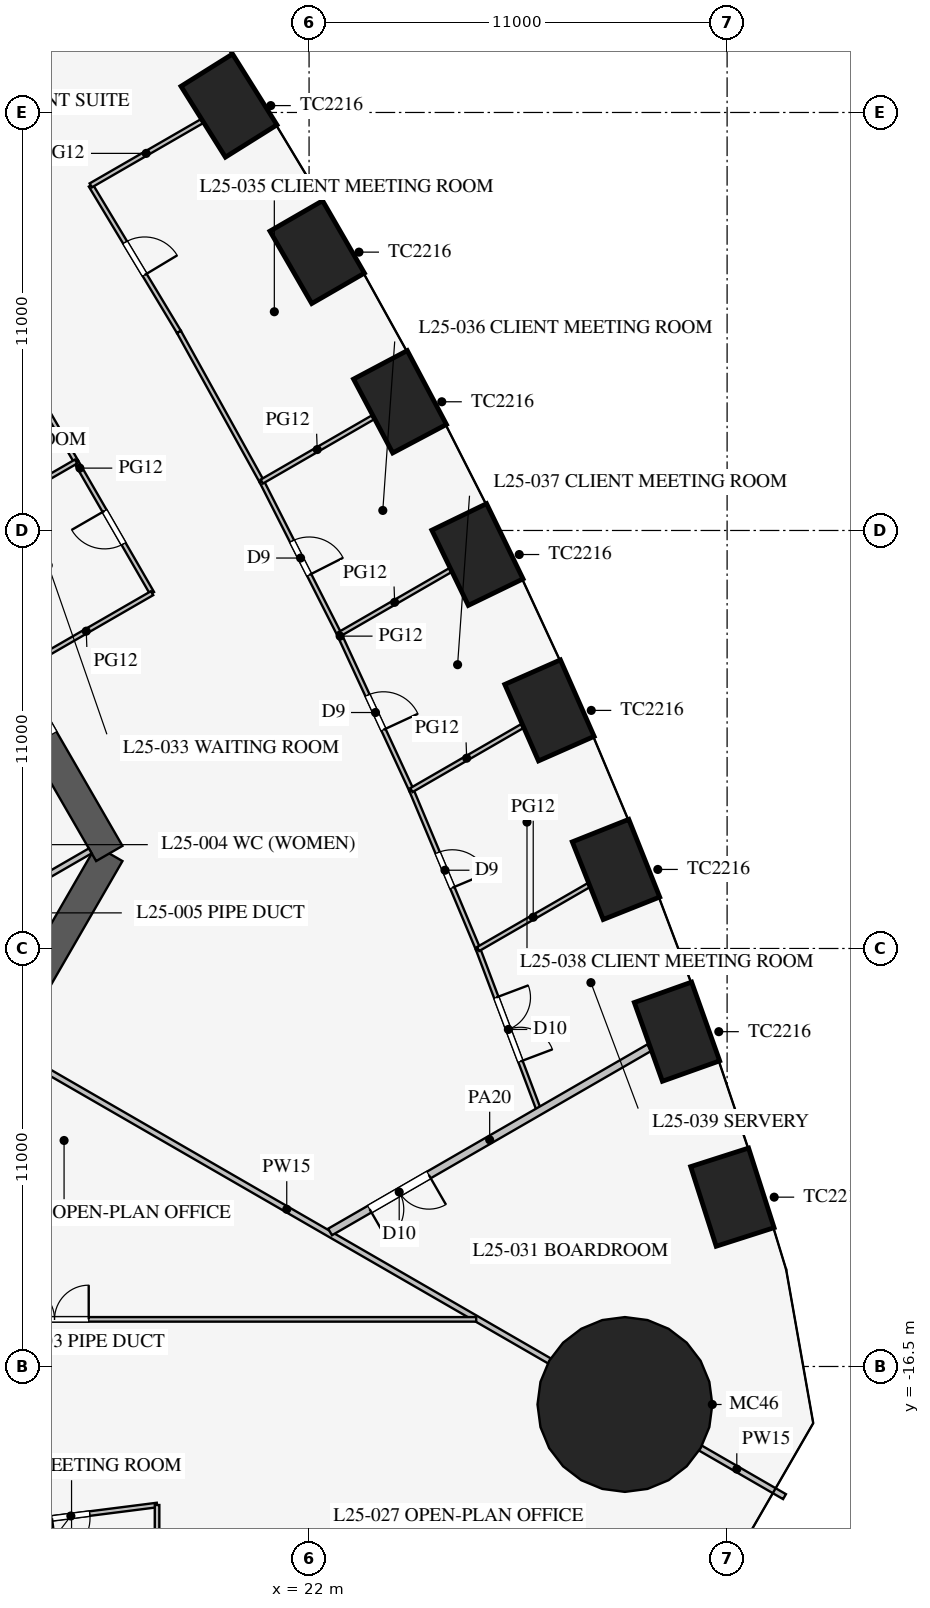
"""IFC4 building model, lengths in metres.
Left out: names, types, materials, properties, quantities, classifications, styles, units other than length and angle.
Written with IfcOpenShell. Run it as: python <this file> out.ifc"""

import sys

from ifc_helpers import new_model, si_unit, direction, frame, frame_2d, origin, origin_2d, place, context, subcontext, project, spatial, rectangle, circle, extrude, element, fill, save


model = new_model("IFC4")
c1 = context("Model", 3, precision=1e-05, world=origin(), true_north=direction((0.0, 1.0)))
c2 = subcontext(c1, "Body", "Model", "MODEL_VIEW")
j1 = project(units=[si_unit("LENGTHUNIT", "METRE"), si_unit("PLANEANGLEUNIT", "RADIAN")], contexts=[c1])
p1 = place(None, origin())
s1 = spatial("IfcSite", under=j1, at=p1, CompositionType="ELEMENT")
p2 = place(p1, origin())
s2 = spatial("IfcBuilding", under=s1, at=p2, CompositionType="ELEMENT")
p3 = place(p2, frame((0.0, 0.0, 111.5)))
s3 = spatial("IfcBuildingStorey", under=s2, at=p3, CompositionType="ELEMENT", Elevation=111.5)
for number, where, z_axis, x_axis in (
    (1, (33.139, -12.044, 0.0), (0.0, 0.0, 1.0), (-0.305, 0.952, 0.0)),
    (2, (31.682, -7.689, 0.0), (0.0, 0.0, 1.0), (-0.336, 0.942, 0.0)),
    (3, (30.077, -3.42, 0.0), (0.0, 0.0, 1.0), (-0.37, 0.929, 0.0)),
    (4, (28.325, 0.765, 0.0), (0.0, 0.0, 1.0), (-0.403, 0.915, 0.0)),
    (5, (26.43, 4.867, 0.0), (0.0, 0.0, 1.0), (-0.436, 0.9, 0.0)),
    (6, (24.393, 8.887, 0.0), (0.0, 0.0, 1.0), (-0.468, 0.883, 0.0)),
    (7, (22.213, 12.825, 0.0), (0.0, 0.0, 1.0), (-0.5, 0.866, 0.0)),
    (8, (19.893, 16.681, 0.0), (0.0, 0.0, 1.0), (-0.531, 0.847, 0.0)),
):
    element("IfcColumn", number, at=place(p3, frame(where, z_axis=z_axis, x_axis=x_axis)), inside=s3, PredefinedType="COLUMN", context=c2, shape_type="SweptSolid", body=[
        extrude(rectangle(XDim=2.2, YDim=1.6, at=origin_2d()), origin(), (0.0, 0.0, 1.0), 4.2),
    ])
p4 = place(p3, frame((30.311, -17.5, 0.0), z_axis=(0.0, 0.0, 1.0), x_axis=(1.0, 0.0, 0.0)))
e9 = element("IfcColumn", 9, at=p4, inside=s3, PredefinedType="COLUMN", context=c2, shape_type="SweptSolid", body=[
    extrude(circle(Radius=2.3, at=origin_2d()), origin(), (0.0, 0.0, 1.0), 4.2),
])
p5 = place(p3, frame((10.97, -13.0, 0.0), z_axis=(0.0, 0.0, 1.0), x_axis=(0.499995765644, 0.866027848477, 0.0)))
e10 = element("IfcWall", 10, at=p5, inside=s3, PredefinedType="SHEAR", context=c2, shape_type="SweptSolid", body=[
    extrude(rectangle(XDim=11.547, YDim=0.8, at=frame_2d((5.773, 0.0))), origin(), (0.0, 0.0, 1.0), 4.2),
])
p6 = place(p3, frame((16.743, -3.0, 0.0), z_axis=(0.0, 0.0, 1.0), x_axis=(-0.500002442456, 0.866023993627, 0.0)))
e11 = element("IfcWall", 11, at=p6, inside=s3, PredefinedType="SHEAR", context=c2, shape_type="SweptSolid", body=[
    extrude(rectangle(XDim=21.939, YDim=0.8, at=frame_2d((10.97, 0.0))), origin(), (0.0, 0.0, 1.0), 4.2),
])
p7 = place(p6, frame((17.27, 0.0, 0.0)))
e12 = element("IfcOpeningElement", 12, at=p7, cuts=e11, PredefinedType="OPENING", context=c2, shape_type="SweptSolid", body=[
    extrude(rectangle(XDim=1.2, YDim=2.1, at=frame_2d((0.6, 1.05))), frame((0.0, 0.41, 0.0), z_axis=(0.0, -1.0, 0.0), x_axis=(1.0, 0.0, 0.0)), (0.0, 0.0, 1.0), 0.82),
])
p8 = place(p6, frame((3.47, 0.0, 0.0)))
e13 = element("IfcOpeningElement", 13, at=p8, cuts=e11, PredefinedType="OPENING", context=c2, shape_type="SweptSolid", body=[
    extrude(rectangle(XDim=1.2, YDim=2.1, at=frame_2d((0.6, 1.05))), frame((0.0, 0.41, 0.0), z_axis=(0.0, -1.0, 0.0), x_axis=(1.0, 0.0, 0.0)), (0.0, 0.0, 1.0), 0.82),
])
p9 = place(p3, frame((12.691, -4.982, 0.0), z_axis=(0.0, 0.0, 1.0), x_axis=(0.8660249478, 0.500000789788, 0.0)))
e14 = element("IfcWall", 14, at=p9, inside=s3, PredefinedType="PARTITIONING", context=c2, shape_type="SweptSolid", body=[
    extrude(rectangle(XDim=4.1, YDim=0.15, at=frame_2d((2.05, 0.0))), origin(), (0.0, 0.0, 1.0), 4.0),
])
p10 = place(p3, frame((14.203, -8.2, 0.0), z_axis=(0.0, 0.0, 1.0), x_axis=(0.866024668836, -0.500001272966, 0.0)))
e15 = element("IfcWall", 15, at=p10, inside=s3, PredefinedType="PARTITIONING", context=c2, shape_type="SweptSolid", body=[
    extrude(rectangle(XDim=16.65, YDim=0.15, at=frame_2d((8.325, 0.0))), origin(), (0.0, 0.0, 1.0), 2.3),
])
p11 = place(p3, frame((32.0, -18.475, 0.0), z_axis=(0.0, 0.0, 1.0), x_axis=(0.866042548026, -0.499970304126, 0.0)))
e16 = element("IfcWall", 16, at=p11, inside=s3, PredefinedType="PARTITIONING", context=c2, shape_type="SweptSolid", body=[
    extrude(rectangle(XDim=2.899, YDim=0.15, at=frame_2d((1.45, 0.0))), origin(), (0.0, 0.0, 1.0), 2.3),
])
p12 = place(p3, frame((-26.398, -15.26, 0.0), z_axis=(0.0, 0.0, 1.0), x_axis=(1.0, 0.0, 0.0)))
e17 = element("IfcWall", 17, at=p12, inside=s3, PredefinedType="PARTITIONING", context=c2, shape_type="SweptSolid", body=[
    extrude(rectangle(XDim=52.796, YDim=0.12, at=frame_2d((26.398, 0.0))), origin(), (0.0, 0.0, 1.0), 2.9),
])
p13 = place(p12, frame((10.2, 0.0, 0.15)))
e18 = element("IfcOpeningElement", 18, at=p13, cuts=e17, PredefinedType="OPENING", context=c2, shape_type="SweptSolid", body=[
    extrude(rectangle(XDim=1.8, YDim=2.1, at=frame_2d((0.9, 1.05))), frame((0.0, 0.07, 0.0), z_axis=(0.0, -1.0, 0.0), x_axis=(1.0, 0.0, 0.0)), (0.0, 0.0, 1.0), 0.14),
])
p14 = place(p12, frame((40.8, 0.0, 0.15)))
e19 = element("IfcOpeningElement", 19, at=p14, cuts=e17, PredefinedType="OPENING", context=c2, shape_type="SweptSolid", body=[
    extrude(rectangle(XDim=1.8, YDim=2.1, at=frame_2d((0.9, 1.05))), frame((0.0, 0.07, 0.0), z_axis=(0.0, -1.0, 0.0), x_axis=(1.0, 0.0, 0.0)), (0.0, 0.0, 1.0), 0.14),
])
p15 = place(p3, frame((13.5, -20.718, 0.0), z_axis=(0.0, 0.0, 1.0), x_axis=(0.992010652594, 0.12615413247, 0.0)))
e20 = element("IfcWall", 20, at=p15, inside=s3, PredefinedType="PARTITIONING", context=c2, shape_type="SweptSolid", body=[
    extrude(rectangle(XDim=4.536, YDim=0.12, at=frame_2d((2.268, 0.0))), origin(), (0.0, 0.0, 1.0), 2.9),
])
p16 = place(p15, frame((1.75, 0.0, 0.15)))
e21 = element("IfcOpeningElement", 21, at=p16, cuts=e20, PredefinedType="OPENING", context=c2, shape_type="SweptSolid", body=[
    extrude(rectangle(XDim=1.0, YDim=2.1, at=frame_2d((0.5, 1.05))), frame((0.0, 0.07, 0.0), z_axis=(0.0, -1.0, 0.0), x_axis=(1.0, 0.0, 0.0)), (0.0, 0.0, 1.0), 0.14),
])
p17 = place(p3, frame((18.0, -20.146, 0.0), z_axis=(0.0, 0.0, 1.0), x_axis=(0.0, -1.0, 0.0)))
e22 = element("IfcWall", 22, at=p17, inside=s3, PredefinedType="PARTITIONING", context=c2, shape_type="SweptSolid", body=[
    extrude(rectangle(XDim=3.353, YDim=0.12, at=frame_2d((1.677, 0.0))), origin(), (0.0, 0.0, 1.0), 2.8),
])
p18 = place(p3, frame((15.869, 7.314, 0.0), z_axis=(0.0, 0.0, 1.0), x_axis=(-0.500012057535, 0.866018442252, 0.0)))
e23 = element("IfcWall", 23, at=p18, inside=s3, PredefinedType="PARTITIONING", context=c2, shape_type="SweptSolid", body=[
    extrude(rectangle(XDim=3.6, YDim=0.12, at=frame_2d((1.8, 0.0))), origin(), (0.0, 0.0, 1.0), 2.9),
])
p19 = place(p18, frame((1.85, 0.0, 0.15)))
e24 = element("IfcOpeningElement", 24, at=p19, cuts=e23, PredefinedType="OPENING", context=c2, shape_type="SweptSolid", body=[
    extrude(rectangle(XDim=1.0, YDim=2.1, at=frame_2d((0.5, 1.05))), frame((0.0, 0.07, 0.0), z_axis=(0.0, -1.0, 0.0), x_axis=(1.0, 0.0, 0.0)), (0.0, 0.0, 1.0), 0.14),
])
p20 = place(p3, frame((17.869, 3.85, 0.0), z_axis=(0.0, 0.0, 1.0), x_axis=(-0.49999894854, 0.866026010844, 0.0)))
e25 = element("IfcWall", 25, at=p20, inside=s3, PredefinedType="PARTITIONING", context=c2, shape_type="SweptSolid", body=[
    extrude(rectangle(XDim=4.0, YDim=0.12, at=frame_2d((2.0, 0.0))), origin(), (0.0, 0.0, 1.0), 2.9),
])
p21 = place(p20, frame((1.5, 0.0, 0.15)))
e26 = element("IfcOpeningElement", 26, at=p21, cuts=e25, PredefinedType="OPENING", context=c2, shape_type="SweptSolid", body=[
    extrude(rectangle(XDim=1.0, YDim=2.1, at=frame_2d((0.5, 1.05))), frame((0.0, 0.07, 0.0), z_axis=(0.0, -1.0, 0.0), x_axis=(1.0, 0.0, 0.0)), (0.0, 0.0, 1.0), 0.14),
])
for number, where, z_axis, x_axis in (
    (27, (12.405, 5.314, 0.0), (0.0, 0.0, 1.0), (0.866, 0.5, 0.0)),
    (28, (14.405, 1.85, 0.0), (0.0, 0.0, 1.0), (0.866, 0.5, 0.0)),
):
    element("IfcWall", number, at=place(p3, frame(where, z_axis=z_axis, x_axis=x_axis)), inside=s3, PredefinedType="PARTITIONING", context=c2, shape_type="SweptSolid", body=[
        extrude(rectangle(XDim=4.0, YDim=0.12, at=frame_2d((2.0, 0.0))), origin(), (0.0, 0.0, 1.0), 2.9),
    ])
p22 = place(p3, frame((18.576, 10.725, 0.0), z_axis=(0.0, 0.0, 1.0), x_axis=(-0.515548366618, 0.856860479703, 0.0)))
e29 = element("IfcWall", 29, at=p22, inside=s3, PredefinedType="PARTITIONING", context=c2, shape_type="SweptSolid", body=[
    extrude(rectangle(XDim=4.501, YDim=0.12, at=frame_2d((2.25, 0.0))), origin(), (0.0, 0.0, 1.0), 2.9),
])
p23 = place(p22, frame((1.75, 0.0, 0.15)))
e30 = element("IfcOpeningElement", 30, at=p23, cuts=e29, PredefinedType="OPENING", context=c2, shape_type="SweptSolid", body=[
    extrude(rectangle(XDim=1.0, YDim=2.1, at=frame_2d((0.5, 1.05))), frame((0.0, 0.07, 0.0), z_axis=(0.0, -1.0, 0.0), x_axis=(1.0, 0.0, 0.0)), (0.0, 0.0, 1.0), 0.14),
])
p24 = place(p3, frame((24.692, -1.333, 0.0), z_axis=(0.0, 0.0, 1.0), x_axis=(-0.41992827805, 0.90755729367, 0.0)))
e31 = element("IfcWall", 31, at=p24, inside=s3, PredefinedType="PARTITIONING", context=c2, shape_type="SweptSolid", body=[
    extrude(rectangle(XDim=4.519, YDim=0.12, at=frame_2d((2.259, 0.0))), origin(), (0.0, 0.0, 1.0), 2.9),
])
p25 = place(p24, frame((1.75, 0.0, 0.15)))
e32 = element("IfcOpeningElement", 32, at=p25, cuts=e31, PredefinedType="OPENING", context=c2, shape_type="SweptSolid", body=[
    extrude(rectangle(XDim=1.0, YDim=2.1, at=frame_2d((0.5, 1.05))), frame((0.0, 0.07, 0.0), z_axis=(0.0, -1.0, 0.0), x_axis=(1.0, 0.0, 0.0)), (0.0, 0.0, 1.0), 0.14),
])
p26 = place(p3, frame((26.447, -5.516, 0.0), z_axis=(0.0, 0.0, 1.0), x_axis=(-0.386762112496, 0.922179520667, 0.0)))
e33 = element("IfcWall", 33, at=p26, inside=s3, PredefinedType="PARTITIONING", context=c2, shape_type="SweptSolid", body=[
    extrude(rectangle(XDim=4.536, YDim=0.12, at=frame_2d((2.268, 0.0))), origin(), (0.0, 0.0, 1.0), 2.9),
])
p27 = place(p26, frame((1.75, 0.0, 0.15)))
e34 = element("IfcOpeningElement", 34, at=p27, cuts=e33, PredefinedType="OPENING", context=c2, shape_type="SweptSolid", body=[
    extrude(rectangle(XDim=1.0, YDim=2.1, at=frame_2d((0.5, 1.05))), frame((0.0, 0.07, 0.0), z_axis=(0.0, -1.0, 0.0), x_axis=(1.0, 0.0, 0.0)), (0.0, 0.0, 1.0), 0.14),
])
p28 = place(p3, frame((28.056, -9.783, 0.0), z_axis=(0.0, 0.0, 1.0), x_axis=(-0.352894560512, 0.93566309597, 0.0)))
e35 = element("IfcWall", 35, at=p28, inside=s3, PredefinedType="PARTITIONING", context=c2, shape_type="SweptSolid", body=[
    extrude(rectangle(XDim=4.561, YDim=0.12, at=frame_2d((2.28, 0.0))), origin(), (0.0, 0.0, 1.0), 2.9),
])
p29 = place(p28, frame((1.4, 0.0, 0.15)))
e36 = element("IfcOpeningElement", 36, at=p29, cuts=e35, PredefinedType="OPENING", context=c2, shape_type="SweptSolid", body=[
    extrude(rectangle(XDim=1.8, YDim=2.1, at=frame_2d((0.9, 1.05))), frame((0.0, 0.07, 0.0), z_axis=(0.0, -1.0, 0.0), x_axis=(1.0, 0.0, 0.0)), (0.0, 0.0, 1.0), 0.14),
])
p30 = place(p3, frame((20.756, 6.787, 0.0), z_axis=(0.0, 0.0, 1.0), x_axis=(-0.484292898211, 0.874905931368, 0.0)))
e37 = element("IfcWall", 37, at=p30, inside=s3, PredefinedType="PARTITIONING", context=c2, shape_type="SweptSolid", body=[
    extrude(rectangle(XDim=4.501, YDim=0.12, at=frame_2d((2.25, 0.0))), origin(), (0.0, 0.0, 1.0), 2.9),
])
p31 = place(p3, frame((22.795, 2.768, 0.0), z_axis=(0.0, 0.0, 1.0), x_axis=(-0.452471679136, 0.891778772779, 0.0)))
e38 = element("IfcWall", 38, at=p31, inside=s3, PredefinedType="PARTITIONING", context=c2, shape_type="SweptSolid", body=[
    extrude(rectangle(XDim=4.507, YDim=0.12, at=frame_2d((2.253, 0.0))), origin(), (0.0, 0.0, 1.0), 2.9),
])
p32 = place(p31, frame((1.75, 0.0, 0.15)))
e39 = element("IfcOpeningElement", 39, at=p32, cuts=e38, PredefinedType="OPENING", context=c2, shape_type="SweptSolid", body=[
    extrude(rectangle(XDim=1.0, YDim=2.1, at=frame_2d((0.5, 1.05))), frame((0.0, 0.07, 0.0), z_axis=(0.0, -1.0, 0.0), x_axis=(1.0, 0.0, 0.0)), (0.0, 0.0, 1.0), 0.14),
])
p33 = place(p3, frame((16.256, 14.581, 0.0), z_axis=(0.0, 0.0, 1.0), x_axis=(0.866022675988, 0.500004724652, 0.0)))
e40 = element("IfcWall", 40, at=p33, inside=s3, PredefinedType="PARTITIONING", context=c2, shape_type="SweptSolid", body=[
    extrude(rectangle(XDim=3.369, YDim=0.12, at=frame_2d((1.685, 0.0))), origin(), (0.0, 0.0, 1.0), 2.8),
])
p34 = place(p3, frame((24.692, -1.333, 0.0), z_axis=(0.0, 0.0, 1.0), x_axis=(0.866025882247, 0.499999171277, 0.0)))
e41 = element("IfcWall", 41, at=p34, inside=s3, PredefinedType="PARTITIONING", context=c2, shape_type="SweptSolid", body=[
    extrude(rectangle(XDim=3.36, YDim=0.12, at=frame_2d((1.68, 0.0))), origin(), (0.0, 0.0, 1.0), 2.6),
])
p35 = place(p3, frame((26.447, -5.516, 0.0), z_axis=(0.0, 0.0, 1.0), x_axis=(0.866025533106, 0.499999776008, 0.0)))
e42 = element("IfcWall", 42, at=p35, inside=s3, PredefinedType="PARTITIONING", context=c2, shape_type="SweptSolid", body=[
    extrude(rectangle(XDim=3.353, YDim=0.12, at=frame_2d((1.677, 0.0))), origin(), (0.0, 0.0, 1.0), 2.8),
])
p36 = place(p3, frame((22.553, -12.96, 0.0), z_axis=(0.0, 0.0, 1.0), x_axis=(0.866028367999, 0.499994865794, 0.0)))
e43 = element("IfcWall", 43, at=p36, inside=s3, PredefinedType="PARTITIONING", context=c2, shape_type="SweptSolid", body=[
    extrude(rectangle(XDim=9.697, YDim=0.2, at=frame_2d((4.849, 0.0))), origin(), (0.0, 0.0, 1.0), 2.9),
])
p37 = place(p36, frame((1.2, 0.0, 0.15)))
e44 = element("IfcOpeningElement", 44, at=p37, cuts=e43, PredefinedType="OPENING", context=c2, shape_type="SweptSolid", body=[
    extrude(rectangle(XDim=1.8, YDim=2.1, at=frame_2d((0.9, 1.05))), frame((0.0, 0.11, 0.0), z_axis=(0.0, -1.0, 0.0), x_axis=(1.0, 0.0, 0.0)), (0.0, 0.0, 1.0), 0.22),
])
p38 = place(p3, frame((20.756, 6.787, 0.0), z_axis=(0.0, 0.0, 1.0), x_axis=(0.866022675988, 0.500004724652, 0.0)))
e45 = element("IfcWall", 45, at=p38, inside=s3, PredefinedType="PARTITIONING", context=c2, shape_type="SweptSolid", body=[
    extrude(rectangle(XDim=3.369, YDim=0.12, at=frame_2d((1.685, 0.0))), origin(), (0.0, 0.0, 1.0), 2.8),
])
p39 = place(p3, frame((22.795, 2.768, 0.0), z_axis=(0.0, 0.0, 1.0), x_axis=(0.866024928363, 0.500000823453, 0.0)))
e46 = element("IfcWall", 46, at=p39, inside=s3, PredefinedType="PARTITIONING", context=c2, shape_type="SweptSolid", body=[
    extrude(rectangle(XDim=3.366, YDim=0.12, at=frame_2d((1.683, 0.0))), origin(), (0.0, 0.0, 1.0), 2.9),
])
p40 = place(p16, frame((1.0, 0.0, 0.0), z_axis=(0.0, 0.0, 1.0), x_axis=(-1.0, 0.0, 0.0)))
e47 = element("IfcDoor", 47, at=p40, inside=s3, OperationType="SINGLE_SWING_RIGHT", PredefinedType="DOOR", context=c2, shape_type="SweptSolid", body=[
    extrude(rectangle(XDim=1.0, YDim=2.1, at=frame_2d((0.5, 1.05))), frame((0.0, 0.025, 0.0), z_axis=(0.0, -1.0, 0.0), x_axis=(1.0, 0.0, 0.0)), (0.0, 0.0, 1.0), 0.05),
])
fill(e21, e47)
p41 = place(p14, origin())
e48 = element("IfcDoor", 48, at=p41, inside=s3, OperationType="DOUBLE_DOOR_SINGLE_SWING", PredefinedType="DOOR", context=c2, shape_type="SweptSolid", body=[
    extrude(rectangle(XDim=1.8, YDim=2.1, at=frame_2d((0.9, 1.05))), frame((0.0, 0.025, 0.0), z_axis=(0.0, -1.0, 0.0), x_axis=(1.0, 0.0, 0.0)), (0.0, 0.0, 1.0), 0.05),
])
fill(e19, e48)
p42 = place(p37, frame((1.8, 0.0, 0.0), z_axis=(0.0, 0.0, 1.0), x_axis=(-1.0, 0.0, 0.0)))
e49 = element("IfcDoor", 49, at=p42, inside=s3, OperationType="DOUBLE_DOOR_SINGLE_SWING", PredefinedType="DOOR", context=c2, shape_type="SweptSolid", body=[
    extrude(rectangle(XDim=1.8, YDim=2.1, at=frame_2d((0.9, 1.05))), frame((0.0, 0.025, 0.0), z_axis=(0.0, -1.0, 0.0), x_axis=(1.0, 0.0, 0.0)), (0.0, 0.0, 1.0), 0.05),
])
fill(e44, e49)
p43 = place(p21, origin())
e50 = element("IfcDoor", 50, at=p43, inside=s3, OperationType="SINGLE_SWING_RIGHT", PredefinedType="DOOR", context=c2, shape_type="SweptSolid", body=[
    extrude(rectangle(XDim=1.0, YDim=2.1, at=frame_2d((0.5, 1.05))), frame((0.0, 0.025, 0.0), z_axis=(0.0, -1.0, 0.0), x_axis=(1.0, 0.0, 0.0)), (0.0, 0.0, 1.0), 0.05),
])
fill(e26, e50)
p44 = place(p23, frame((1.0, 0.0, 0.0), z_axis=(0.0, 0.0, 1.0), x_axis=(-1.0, 0.0, 0.0)))
e51 = element("IfcDoor", 51, at=p44, inside=s3, OperationType="SINGLE_SWING_RIGHT", PredefinedType="DOOR", context=c2, shape_type="SweptSolid", body=[
    extrude(rectangle(XDim=1.0, YDim=2.1, at=frame_2d((0.5, 1.05))), frame((0.0, 0.025, 0.0), z_axis=(0.0, -1.0, 0.0), x_axis=(1.0, 0.0, 0.0)), (0.0, 0.0, 1.0), 0.05),
])
fill(e30, e51)
p45 = place(p32, frame((1.0, 0.0, 0.0), z_axis=(0.0, 0.0, 1.0), x_axis=(-1.0, 0.0, 0.0)))
e52 = element("IfcDoor", 52, at=p45, inside=s3, OperationType="SINGLE_SWING_RIGHT", PredefinedType="DOOR", context=c2, shape_type="SweptSolid", body=[
    extrude(rectangle(XDim=1.0, YDim=2.1, at=frame_2d((0.5, 1.05))), frame((0.0, 0.025, 0.0), z_axis=(0.0, -1.0, 0.0), x_axis=(1.0, 0.0, 0.0)), (0.0, 0.0, 1.0), 0.05),
])
fill(e39, e52)
p46 = place(p25, frame((1.0, 0.0, 0.0), z_axis=(0.0, 0.0, 1.0), x_axis=(-1.0, 0.0, 0.0)))
e53 = element("IfcDoor", 53, at=p46, inside=s3, OperationType="SINGLE_SWING_RIGHT", PredefinedType="DOOR", context=c2, shape_type="SweptSolid", body=[
    extrude(rectangle(XDim=1.0, YDim=2.1, at=frame_2d((0.5, 1.05))), frame((0.0, 0.025, 0.0), z_axis=(0.0, -1.0, 0.0), x_axis=(1.0, 0.0, 0.0)), (0.0, 0.0, 1.0), 0.05),
])
fill(e32, e53)
p47 = place(p27, frame((1.0, 0.0, 0.0), z_axis=(0.0, 0.0, 1.0), x_axis=(-1.0, 0.0, 0.0)))
e54 = element("IfcDoor", 54, at=p47, inside=s3, OperationType="SINGLE_SWING_RIGHT", PredefinedType="DOOR", context=c2, shape_type="SweptSolid", body=[
    extrude(rectangle(XDim=1.0, YDim=2.1, at=frame_2d((0.5, 1.05))), frame((0.0, 0.025, 0.0), z_axis=(0.0, -1.0, 0.0), x_axis=(1.0, 0.0, 0.0)), (0.0, 0.0, 1.0), 0.05),
])
fill(e34, e54)
p48 = place(p29, frame((1.8, 0.0, 0.0), z_axis=(0.0, 0.0, 1.0), x_axis=(-1.0, 0.0, 0.0)))
e55 = element("IfcDoor", 55, at=p48, inside=s3, OperationType="DOUBLE_DOOR_SINGLE_SWING", PredefinedType="DOOR", context=c2, shape_type="SweptSolid", body=[
    extrude(rectangle(XDim=1.8, YDim=2.1, at=frame_2d((0.9, 1.05))), frame((0.0, 0.025, 0.0), z_axis=(0.0, -1.0, 0.0), x_axis=(1.0, 0.0, 0.0)), (0.0, 0.0, 1.0), 0.05),
])
fill(e36, e55)
save(model, sys.argv[1])
